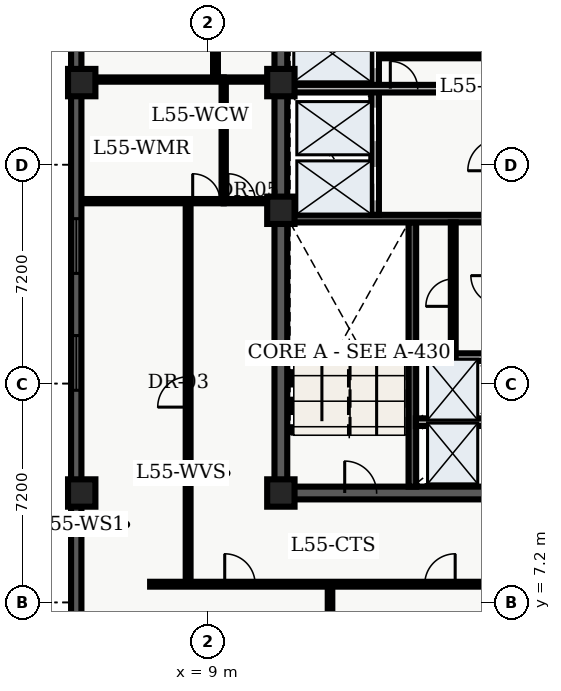
"""IFC4 building model, lengths in metres.
Left out: names, types, materials, properties, quantities, classifications, styles, units other than length and angle.
Written with IfcOpenShell. Run it as: python <this file> out.ifc"""

import sys

from ifc_helpers import new_model, entity, si_unit, converted_unit, direction, frame, origin_with_axes, origin_2d_with_axis, place, context, subcontext, project, spatial, polyline, rectangle, outline, extrude, element, fill, save


model = new_model("IFC4")
c1 = context("Model", 3, precision=1e-05, world=origin_with_axes(), true_north=direction((0.0, 1.0)))
c2 = subcontext(c1, "Body", "Model", "MODEL_VIEW")
j1 = project(units=[si_unit("LENGTHUNIT", "METRE"), converted_unit("PLANEANGLEUNIT", "DEGREE", entity("IfcPlaneAngleMeasure", 0.017), si_unit("PLANEANGLEUNIT", "RADIAN"), dimensions=[0, 0, 0, 0, 0, 0, 0])], contexts=[c1])
p1 = place(None, origin_with_axes())
s1 = spatial("IfcSite", under=j1, at=p1, CompositionType="ELEMENT")
p2 = place(p1, origin_with_axes())
s2 = spatial("IfcBuilding", under=s1, at=p2, CompositionType="ELEMENT")
p3 = place(p2, frame((0.0, 0.0, 224.7), z_axis=(0.0, 0.0, 1.0), x_axis=(1.0, 0.0, 0.0)))
s3 = spatial("IfcBuildingStorey", under=s2, at=p3, CompositionType="ELEMENT", Elevation=224.7)
p4 = place(p3, frame((11.4, 10.8, 0.0), z_axis=(0.0, 0.0, 1.0), x_axis=(0.0, 1.0, 0.0)))
e1 = element("IfcWall", 1, at=p4, inside=s3, PredefinedType="SHEAR", context=c2, shape_type="SweptSolid", body=[
    extrude(outline(polyline([(0.0, -0.21), (27.0, -0.21), (27.0, 0.21), (0.0, 0.21), (0.0, -0.21)])), origin_with_axes(), (0.0, 0.0, 1.0), 3.66),
])
p5 = place(p3, frame((11.4, 10.8, 0.0), z_axis=(0.0, 0.0, 1.0), x_axis=(1.0, 0.0, 0.0)))
e2 = element("IfcWall", 2, at=p5, inside=s3, PredefinedType="SHEAR", context=c2, shape_type="SweptSolid", body=[
    extrude(outline(polyline([(0.0, -0.21), (7.2, -0.21), (7.2, 0.21), (0.0, 0.21), (0.0, -0.21)])), origin_with_axes(), (0.0, 0.0, 1.0), 3.66),
])
p6 = place(p5, frame((2.625, 0.0, 0.0), z_axis=(0.0, 0.0, 1.0), x_axis=(1.0, 0.0, 0.0)))
e3 = element("IfcOpeningElement", 3, at=p6, cuts=e2, PredefinedType="OPENING", context=c2, shape_type="SweptSolid", body=[
    extrude(rectangle(XDim=1.05, YDim=0.44, at=origin_2d_with_axis()), origin_with_axes(), (0.0, 0.0, 1.0), 2.15),
])
p7 = place(p3, frame((15.725, 11.01, 0.0), z_axis=(0.0, 0.0, 1.0), x_axis=(0.0, 1.0, 0.0)))
e4 = element("IfcWall", 4, at=p7, inside=s3, PredefinedType="SHEAR", context=c2, shape_type="SweptSolid", body=[
    extrude(outline(polyline([(0.0, -0.125), (8.69, -0.125), (8.69, 0.125), (0.0, 0.125), (0.0, -0.125)])), origin_with_axes(), (0.0, 0.0, 1.0), 3.66),
])
p8 = place(p3, frame((11.61, 19.825, 0.0), z_axis=(0.0, 0.0, 1.0), x_axis=(1.0, 0.0, 0.0)))
e5 = element("IfcWall", 5, at=p8, inside=s3, PredefinedType="SHEAR", context=c2, shape_type="SweptSolid", body=[
    extrude(outline(polyline([(0.0, -0.125), (6.78, -0.125), (6.78, 0.125), (0.0, 0.125), (0.0, -0.125)])), origin_with_axes(), (0.0, 0.0, 1.0), 3.66),
])
p9 = place(p3, frame((14.5, 19.95, 0.0), z_axis=(0.0, 0.0, 1.0), x_axis=(0.0, 1.0, 0.0)))
e6 = element("IfcWall", 6, at=p9, inside=s3, PredefinedType="SOLIDWALL", context=c2, shape_type="SweptSolid", body=[
    extrude(outline(polyline([(0.0, -0.125), (6.25, -0.125), (6.25, 0.125), (0.0, 0.125), (0.0, -0.125)])), origin_with_axes(), (0.0, 0.0, 1.0), 2.7),
])
p10 = place(p9, frame((1.025, 0.0, 0.0), z_axis=(0.0, 0.0, 1.0), x_axis=(1.0, 0.0, 0.0)))
e7 = element("IfcOpeningElement", 7, at=p10, cuts=e6, PredefinedType="OPENING", context=c2, shape_type="SweptSolid", body=[
    extrude(rectangle(XDim=1.1, YDim=0.27, at=origin_2d_with_axis()), origin_with_axes(), (0.0, 0.0, 1.0), 2.15),
])
p11 = place(p9, frame((2.975, 0.0, 0.0), z_axis=(0.0, 0.0, 1.0), x_axis=(1.0, 0.0, 0.0)))
e8 = element("IfcOpeningElement", 8, at=p11, cuts=e6, PredefinedType="OPENING", context=c2, shape_type="SweptSolid", body=[
    extrude(rectangle(XDim=1.1, YDim=0.27, at=origin_2d_with_axis()), origin_with_axes(), (0.0, 0.0, 1.0), 2.15),
])
p12 = place(p9, frame((5.425, 0.0, 0.0), z_axis=(0.0, 0.0, 1.0), x_axis=(1.0, 0.0, 0.0)))
e9 = element("IfcOpeningElement", 9, at=p12, cuts=e6, PredefinedType="OPENING", context=c2, shape_type="SweptSolid", body=[
    extrude(rectangle(XDim=1.2, YDim=0.27, at=origin_2d_with_axis()), origin_with_axes(), (0.0, 0.0, 1.0), 2.15),
])
p13 = place(p3, frame((11.7, 24.1, 0.0), z_axis=(0.0, 0.0, 1.0), x_axis=(1.0, 0.0, 0.0)))
e10 = element("IfcWall", 10, at=p13, inside=s3, PredefinedType="SOLIDWALL", context=c2, shape_type="SweptSolid", body=[
    extrude(outline(polyline([(0.0, -0.125), (6.6, -0.125), (6.6, 0.125), (0.0, 0.125), (0.0, -0.125)])), origin_with_axes(), (0.0, 0.0, 1.0), 2.7),
])
p14 = place(p13, frame((3.75, 0.0, 0.0), z_axis=(0.0, 0.0, 1.0), x_axis=(1.0, 0.0, 0.0)))
e11 = element("IfcOpeningElement", 11, at=p14, cuts=e10, PredefinedType="OPENING", context=c2, shape_type="SweptSolid", body=[
    extrude(rectangle(XDim=0.9, YDim=0.27, at=origin_2d_with_axis()), origin_with_axes(), (0.0, 0.0, 1.0), 2.15),
])
for number, where, z_axis, x_axis in (
    (12, (11.4, 10.8, 0.0), (0.0, 0.0, 1.0), (1.0, 0.0, 0.0)),
    (13, (11.4, 20.1, 0.0), (0.0, 0.0, 1.0), (1.0, 0.0, 0.0)),
    (14, (11.4, 24.3, 0.0), (0.0, 0.0, 1.0), (1.0, 0.0, 0.0)),
    (15, (4.85, 10.8, 0.0), (0.0, 0.0, 1.0), (1.0, 0.0, 0.0)),
    (16, (4.85, 24.3, 0.0), (0.0, 0.0, 1.0), (1.0, 0.0, 0.0)),
):
    element("IfcColumn", number, at=place(p3, frame(where, z_axis=z_axis, x_axis=x_axis)), inside=s3, PredefinedType="COLUMN", context=c2, shape_type="SweptSolid", body=[
        extrude(rectangle(XDim=0.9, YDim=0.9, at=origin_2d_with_axis()), origin_with_axes(), (0.0, 0.0, 1.0), 3.9),
    ])
p15 = place(p3, frame((14.62, 25.18, 0.0), z_axis=(0.0, 0.0, 1.0), x_axis=(1.0, 0.0, 0.0)))
e17 = element("IfcWall", 17, at=p15, inside=s3, PredefinedType="PARTITIONING", context=c2, shape_type="SweptSolid", body=[
    extrude(outline(polyline([(0.0, -0.08), (3.68, -0.08), (3.68, 0.08), (0.0, 0.08), (0.0, -0.08)])), origin_with_axes(), (0.0, 0.0, 1.0), 2.7),
])
p16 = place(p15, frame((1.95, 0.0, 0.0), z_axis=(0.0, 0.0, 1.0), x_axis=(1.0, 0.0, 0.0)))
e18 = element("IfcOpeningElement", 18, at=p16, cuts=e17, PredefinedType="OPENING", context=c2, shape_type="SweptSolid", body=[
    extrude(rectangle(XDim=0.9, YDim=0.18, at=origin_2d_with_axis()), origin_with_axes(), (0.0, 0.0, 1.0), 2.15),
])
for number, where, z_axis, x_axis in (
    (19, (15.84, 13.13, 0.0), (0.0, 0.0, 1.0), (1.0, 0.0, 0.0)),
    (20, (15.84, 15.27, 0.0), (0.0, 0.0, 1.0), (1.0, 0.0, 0.0)),
):
    element("IfcWall", number, at=place(p3, frame(where, z_axis=z_axis, x_axis=x_axis)), inside=s3, PredefinedType="SOLIDWALL", context=c2, shape_type="SweptSolid", body=[
        extrude(outline(polyline([(0.0, -0.125), (2.46, -0.125), (2.46, 0.125), (0.0, 0.125), (0.0, -0.125)])), origin_with_axes(), (0.0, 0.0, 1.0), 2.7),
    ])
p17 = place(p3, frame((17.07, 15.34, 0.0), z_axis=(0.0, 0.0, 1.0), x_axis=(0.0, 1.0, 0.0)))
e21 = element("IfcWall", 21, at=p17, inside=s3, PredefinedType="PARTITIONING", context=c2, shape_type="SweptSolid", body=[
    extrude(outline(polyline([(0.0, -0.08), (4.36, -0.08), (4.36, 0.08), (0.0, 0.08), (0.0, -0.08)])), origin_with_axes(), (0.0, 0.0, 1.0), 2.7),
])
p18 = place(p17, frame((2.05, 0.0, 0.0), z_axis=(0.0, 0.0, 1.0), x_axis=(1.0, 0.0, 0.0)))
e22 = element("IfcOpeningElement", 22, at=p18, cuts=e21, PredefinedType="OPENING", context=c2, shape_type="SweptSolid", body=[
    extrude(rectangle(XDim=0.9, YDim=0.18, at=origin_2d_with_axis()), origin_with_axes(), (0.0, 0.0, 1.0), 2.15),
])
p19 = place(p3, frame((9.52, 20.4, 0.0), z_axis=(0.0, 0.0, 1.0), x_axis=(0.0, 1.0, 0.0)))
e23 = element("IfcWall", 23, at=p19, inside=s3, PredefinedType="PARTITIONING", context=c2, shape_type="SweptSolid", body=[
    extrude(outline(polyline([(0.0, -0.07), (4.0, -0.07), (4.0, 0.07), (0.0, 0.07), (0.0, -0.07)])), origin_with_axes(), (0.0, 0.0, 1.0), 2.7),
])
p20 = place(p3, frame((9.52, 20.4, 0.0), z_axis=(0.0, 0.0, 1.0), x_axis=(1.0, 0.0, 0.0)))
e24 = element("IfcWall", 24, at=p20, inside=s3, PredefinedType="PARTITIONING", context=c2, shape_type="SweptSolid", body=[
    extrude(outline(polyline([(0.0, -0.07), (1.58, -0.07), (1.58, 0.07), (0.0, 0.07), (0.0, -0.07)])), origin_with_axes(), (0.0, 0.0, 1.0), 2.7),
])
p21 = place(p20, frame((0.59, 0.0, 0.0), z_axis=(0.0, 0.0, 1.0), x_axis=(1.0, 0.0, 0.0)))
e25 = element("IfcOpeningElement", 25, at=p21, cuts=e24, PredefinedType="OPENING", context=c2, shape_type="SweptSolid", body=[
    extrude(rectangle(XDim=0.9, YDim=0.16, at=origin_2d_with_axis()), origin_with_axes(), (0.0, 0.0, 1.0), 2.15),
])
p22 = place(p3, frame((9.52, 24.4, 0.0), z_axis=(0.0, 0.0, 1.0), x_axis=(1.0, 0.0, 0.0)))
e26 = element("IfcWall", 26, at=p22, inside=s3, PredefinedType="PARTITIONING", context=c2, shape_type="SweptSolid", body=[
    extrude(outline(polyline([(0.0, -0.07), (1.58, -0.07), (1.58, 0.07), (0.0, 0.07), (0.0, -0.07)])), origin_with_axes(), (0.0, 0.0, 1.0), 2.7),
])
p23 = place(p3, frame((7.1, 7.8, 0.0), z_axis=(0.0, 0.0, 1.0), x_axis=(1.0, 0.0, 0.0)))
e27 = element("IfcWall", 27, at=p23, inside=s3, PredefinedType="PARTITIONING", context=c2, shape_type="SweptSolid", body=[
    extrude(outline(polyline([(0.0, -0.08), (13.2, -0.08), (13.2, 0.08), (0.0, 0.08), (0.0, -0.08)])), origin_with_axes(), (0.0, 0.0, 1.0), 2.7),
])
p24 = place(p23, frame((2.954, 0.0, 0.0), z_axis=(0.0, 0.0, 1.0), x_axis=(1.0, 0.0, 0.0)))
e28 = element("IfcOpeningElement", 28, at=p24, cuts=e27, PredefinedType="OPENING", context=c2, shape_type="SweptSolid", body=[
    extrude(rectangle(XDim=1.0, YDim=0.18, at=origin_2d_with_axis()), origin_with_axes(), (0.0, 0.0, 1.0), 2.15),
])
p25 = place(p23, frame((9.534, 0.0, 0.0), z_axis=(0.0, 0.0, 1.0), x_axis=(1.0, 0.0, 0.0)))
e29 = element("IfcOpeningElement", 29, at=p25, cuts=e27, PredefinedType="OPENING", context=c2, shape_type="SweptSolid", body=[
    extrude(rectangle(XDim=1.0, YDim=0.18, at=origin_2d_with_axis()), origin_with_axes(), (0.0, 0.0, 1.0), 2.15),
])
p26 = place(p3, frame((8.35, 7.8, 0.0), z_axis=(0.0, 0.0, 1.0), x_axis=(0.0, 1.0, 0.0)))
e30 = element("IfcWall", 30, at=p26, inside=s3, PredefinedType="PARTITIONING", context=c2, shape_type="SweptSolid", body=[
    extrude(outline(polyline([(0.0, -0.08), (12.6, -0.08), (12.6, 0.08), (0.0, 0.08), (0.0, -0.08)])), origin_with_axes(), (0.0, 0.0, 1.0), 2.7),
])
p27 = place(p26, frame((6.325, 0.0, 0.0), z_axis=(0.0, 0.0, 1.0), x_axis=(1.0, 0.0, 0.0)))
e31 = element("IfcOpeningElement", 31, at=p27, cuts=e30, PredefinedType="OPENING", context=c2, shape_type="SweptSolid", body=[
    extrude(rectangle(XDim=1.0, YDim=0.18, at=origin_2d_with_axis()), origin_with_axes(), (0.0, 0.0, 1.0), 2.15),
])
p28 = place(p3, frame((9.25, 24.4, 0.0), z_axis=(0.0, 0.0, 1.0), x_axis=(0.0, 1.0, 0.0)))
e32 = element("IfcWall", 32, at=p28, inside=s3, PredefinedType="PARTITIONING", context=c2, shape_type="SweptSolid", body=[
    extrude(outline(polyline([(0.0, -0.08), (16.1, -0.08), (16.1, 0.08), (0.0, 0.08), (0.0, -0.08)])), origin_with_axes(), (0.0, 0.0, 1.0), 2.7),
])
p29 = place(p28, frame((3.708, 0.0, 0.0), z_axis=(0.0, 0.0, 1.0), x_axis=(1.0, 0.0, 0.0)))
e33 = element("IfcOpeningElement", 33, at=p29, cuts=e32, PredefinedType="OPENING", context=c2, shape_type="SweptSolid", body=[
    extrude(rectangle(XDim=1.0, YDim=0.18, at=origin_2d_with_axis()), origin_with_axes(), (0.0, 0.0, 1.0), 2.15),
])
p30 = place(p28, frame((11.653, 0.0, 0.0), z_axis=(0.0, 0.0, 1.0), x_axis=(1.0, 0.0, 0.0)))
e34 = element("IfcOpeningElement", 34, at=p30, cuts=e32, PredefinedType="OPENING", context=c2, shape_type="SweptSolid", body=[
    extrude(rectangle(XDim=1.0, YDim=0.18, at=origin_2d_with_axis()), origin_with_axes(), (0.0, 0.0, 1.0), 2.15),
])
p31 = place(p3, frame((4.835, 20.4, 0.0), z_axis=(0.0, 0.0, 1.0), x_axis=(1.0, 0.0, 0.0)))
e35 = element("IfcWall", 35, at=p31, inside=s3, PredefinedType="PARTITIONING", context=c2, shape_type="SweptSolid", body=[
    extrude(outline(polyline([(0.0, -0.07), (4.685, -0.07), (4.685, 0.07), (0.0, 0.07), (0.0, -0.07)])), origin_with_axes(), (0.0, 0.0, 1.0), 2.7),
])
p32 = place(p31, frame((4.115, 0.0, 0.0), z_axis=(0.0, 0.0, 1.0), x_axis=(1.0, 0.0, 0.0)))
e36 = element("IfcOpeningElement", 36, at=p32, cuts=e35, PredefinedType="OPENING", context=c2, shape_type="SweptSolid", body=[
    extrude(rectangle(XDim=0.9, YDim=0.16, at=origin_2d_with_axis()), origin_with_axes(), (0.0, 0.0, 1.0), 2.15),
])
p33 = place(p3, frame((4.835, 24.4, 0.0), z_axis=(0.0, 0.0, 1.0), x_axis=(1.0, 0.0, 0.0)))
e37 = element("IfcWall", 37, at=p33, inside=s3, PredefinedType="PARTITIONING", context=c2, shape_type="SweptSolid", body=[
    extrude(outline(polyline([(0.0, -0.07), (4.685, -0.07), (4.685, 0.07), (0.0, 0.07), (0.0, -0.07)])), origin_with_axes(), (0.0, 0.0, 1.0), 2.7),
])
p34 = place(p3, frame((13.017, 0.335, 0.0), z_axis=(0.0, 0.0, 1.0), x_axis=(0.0, 1.0, 0.0)))
e38 = element("IfcWall", 38, at=p34, inside=s3, PredefinedType="PARTITIONING", context=c2, shape_type="SweptSolid", body=[
    extrude(outline(polyline([(0.0, -0.075), (7.365, -0.075), (7.365, 0.075), (0.0, 0.075), (0.0, -0.075)])), origin_with_axes(), (0.0, 0.0, 1.0), 2.7),
])
p35 = place(p3, frame((4.67, 2.74, 0.0), z_axis=(0.0, 0.0, 1.0), x_axis=(0.0, 1.0, 0.0)))
e39 = element("IfcWall", 39, at=p35, inside=s3, PredefinedType="SOLIDWALL", context=c2, shape_type="SweptSolid", body=[
    extrude(outline(polyline([(0.0, -0.17), (43.46, -0.17), (43.46, 0.17), (0.0, 0.17), (0.0, -0.17)])), origin_with_axes(), (0.0, 0.0, 1.0), 3.66),
])
p36 = place(p35, frame((2.948, 0.0, 0.45), z_axis=(0.0, 0.0, 1.0), x_axis=(1.0, 0.0, 0.0)))
e40 = element("IfcOpeningElement", 40, at=p36, cuts=e39, PredefinedType="OPENING", context=c2, shape_type="SweptSolid", body=[
    extrude(rectangle(XDim=1.8, YDim=0.36, at=origin_2d_with_axis()), origin_with_axes(), (0.0, 0.0, 1.0), 2.1),
])
p37 = place(p35, frame((12.339, 0.0, 0.45), z_axis=(0.0, 0.0, 1.0), x_axis=(1.0, 0.0, 0.0)))
e41 = element("IfcOpeningElement", 41, at=p37, cuts=e39, PredefinedType="OPENING", context=c2, shape_type="SweptSolid", body=[
    extrude(rectangle(XDim=1.8, YDim=0.36, at=origin_2d_with_axis()), origin_with_axes(), (0.0, 0.0, 1.0), 2.1),
])
p38 = place(p35, frame((16.184, 0.0, 0.45), z_axis=(0.0, 0.0, 1.0), x_axis=(1.0, 0.0, 0.0)))
e42 = element("IfcOpeningElement", 42, at=p38, cuts=e39, PredefinedType="OPENING", context=c2, shape_type="SweptSolid", body=[
    extrude(rectangle(XDim=1.8, YDim=0.36, at=origin_2d_with_axis()), origin_with_axes(), (0.0, 0.0, 1.0), 2.1),
])
p39 = place(p35, frame((26.426, 0.0, 0.45), z_axis=(0.0, 0.0, 1.0), x_axis=(1.0, 0.0, 0.0)))
e43 = element("IfcOpeningElement", 43, at=p39, cuts=e39, PredefinedType="OPENING", context=c2, shape_type="SweptSolid", body=[
    extrude(rectangle(XDim=1.8, YDim=0.36, at=origin_2d_with_axis()), origin_with_axes(), (0.0, 0.0, 1.0), 2.1),
])
p40 = place(p35, frame((31.121, 0.0, 0.45), z_axis=(0.0, 0.0, 1.0), x_axis=(1.0, 0.0, 0.0)))
e44 = element("IfcOpeningElement", 44, at=p40, cuts=e39, PredefinedType="OPENING", context=c2, shape_type="SweptSolid", body=[
    extrude(rectangle(XDim=1.8, YDim=0.36, at=origin_2d_with_axis()), origin_with_axes(), (0.0, 0.0, 1.0), 2.1),
])
p41 = place(p35, frame((40.062, 0.0, 0.45), z_axis=(0.0, 0.0, 1.0), x_axis=(1.0, 0.0, 0.0)))
e45 = element("IfcOpeningElement", 45, at=p41, cuts=e39, PredefinedType="OPENING", context=c2, shape_type="SweptSolid", body=[
    extrude(rectangle(XDim=1.8, YDim=0.36, at=origin_2d_with_axis()), origin_with_axes(), (0.0, 0.0, 1.0), 2.1),
])
p42 = place(p9, frame((1.025, 0.0, 0.0), z_axis=(0.0, 0.0, 1.0), x_axis=(1.0, 0.0, 0.0)))
e46 = element("IfcDoor", 46, at=p42, inside=s3, OperationType="SLIDING_TO_LEFT", PredefinedType="DOOR", context=c2, shape_type="SweptSolid", body=[
    extrude(rectangle(XDim=1.1, YDim=0.09, at=origin_2d_with_axis()), origin_with_axes(), (0.0, 0.0, 1.0), 2.15),
])
fill(e7, e46)
p43 = place(p9, frame((2.975, 0.0, 0.0), z_axis=(0.0, 0.0, 1.0), x_axis=(1.0, 0.0, 0.0)))
e47 = element("IfcDoor", 47, at=p43, inside=s3, OperationType="SLIDING_TO_RIGHT", PredefinedType="DOOR", context=c2, shape_type="SweptSolid", body=[
    extrude(rectangle(XDim=1.1, YDim=0.09, at=origin_2d_with_axis()), origin_with_axes(), (0.0, 0.0, 1.0), 2.15),
])
fill(e8, e47)
p44 = place(p9, frame((5.425, 0.0, 0.0), z_axis=(0.0, 0.0, 1.0), x_axis=(1.0, 0.0, 0.0)))
e48 = element("IfcDoor", 48, at=p44, inside=s3, OperationType="DOUBLE_DOOR_SLIDING", PredefinedType="DOOR", context=c2, shape_type="SweptSolid", body=[
    extrude(rectangle(XDim=1.2, YDim=0.09, at=origin_2d_with_axis()), origin_with_axes(), (0.0, 0.0, 1.0), 2.15),
])
fill(e9, e48)
p45 = place(p5, frame((2.625, 0.0, 0.0), z_axis=(0.0, 0.0, 1.0), x_axis=(1.0, 0.0, 0.0)))
e49 = element("IfcDoor", 49, at=p45, inside=s3, OperationType="SINGLE_SWING_LEFT", PredefinedType="DOOR", context=c2, shape_type="SweptSolid", body=[
    extrude(rectangle(XDim=1.05, YDim=0.09, at=origin_2d_with_axis()), origin_with_axes(), (0.0, 0.0, 1.0), 2.15),
])
fill(e3, e49)
p46 = place(p13, frame((3.75, 0.0, 0.0), z_axis=(0.0, 0.0, 1.0), x_axis=(1.0, 0.0, 0.0)))
e50 = element("IfcDoor", 50, at=p46, inside=s3, OperationType="SINGLE_SWING_LEFT", PredefinedType="DOOR", context=c2, shape_type="SweptSolid", body=[
    extrude(rectangle(XDim=0.9, YDim=0.09, at=origin_2d_with_axis()), origin_with_axes(), (0.0, 0.0, 1.0), 2.15),
])
fill(e11, e50)
p47 = place(p15, frame((1.95, 0.0, 0.0), z_axis=(0.0, 0.0, 1.0), x_axis=(1.0, 0.0, 0.0)))
e51 = element("IfcDoor", 51, at=p47, inside=s3, OperationType="SINGLE_SWING_LEFT", PredefinedType="DOOR", context=c2, shape_type="SweptSolid", body=[
    extrude(rectangle(XDim=0.9, YDim=0.09, at=origin_2d_with_axis()), origin_with_axes(), (0.0, 0.0, 1.0), 2.15),
])
fill(e18, e51)
p48 = place(p17, frame((2.05, 0.0, 0.0), z_axis=(0.0, 0.0, 1.0), x_axis=(1.0, 0.0, 0.0)))
e52 = element("IfcDoor", 52, at=p48, inside=s3, OperationType="SINGLE_SWING_LEFT", PredefinedType="DOOR", context=c2, shape_type="SweptSolid", body=[
    extrude(rectangle(XDim=0.9, YDim=0.09, at=origin_2d_with_axis()), origin_with_axes(), (0.0, 0.0, 1.0), 2.15),
])
fill(e22, e52)
p49 = place(p20, frame((0.59, 0.0, 0.0), z_axis=(0.0, 0.0, 1.0), x_axis=(1.0, 0.0, 0.0)))
e53 = element("IfcDoor", 53, at=p49, inside=s3, OperationType="SINGLE_SWING_LEFT", PredefinedType="DOOR", context=c2, shape_type="SweptSolid", body=[
    extrude(rectangle(XDim=0.9, YDim=0.084, at=origin_2d_with_axis()), origin_with_axes(), (0.0, 0.0, 1.0), 2.15),
])
fill(e25, e53)
p50 = place(p31, frame((4.115, 0.0, 0.0), z_axis=(0.0, 0.0, 1.0), x_axis=(1.0, 0.0, 0.0)))
e54 = element("IfcDoor", 54, at=p50, inside=s3, OperationType="SINGLE_SWING_LEFT", PredefinedType="DOOR", context=c2, shape_type="SweptSolid", body=[
    extrude(rectangle(XDim=0.9, YDim=0.084, at=origin_2d_with_axis()), origin_with_axes(), (0.0, 0.0, 1.0), 2.15),
])
fill(e36, e54)
p51 = place(p26, frame((6.325, 0.0, 0.0), z_axis=(0.0, 0.0, 1.0), x_axis=(1.0, 0.0, 0.0)))
e55 = element("IfcDoor", 55, at=p51, inside=s3, OperationType="SINGLE_SWING_LEFT", PredefinedType="DOOR", context=c2, shape_type="SweptSolid", body=[
    extrude(rectangle(XDim=1.0, YDim=0.09, at=origin_2d_with_axis()), origin_with_axes(), (0.0, 0.0, 1.0), 2.15),
])
fill(e31, e55)
p52 = place(p23, frame((2.954, 0.0, 0.0), z_axis=(0.0, 0.0, 1.0), x_axis=(1.0, 0.0, 0.0)))
e56 = element("IfcDoor", 56, at=p52, inside=s3, OperationType="SINGLE_SWING_LEFT", PredefinedType="DOOR", context=c2, shape_type="SweptSolid", body=[
    extrude(rectangle(XDim=1.0, YDim=0.09, at=origin_2d_with_axis()), origin_with_axes(), (0.0, 0.0, 1.0), 2.15),
])
fill(e28, e56)
p53 = place(p23, frame((9.534, 0.0, 0.0), z_axis=(0.0, 0.0, 1.0), x_axis=(1.0, 0.0, 0.0)))
e57 = element("IfcDoor", 57, at=p53, inside=s3, OperationType="SINGLE_SWING_RIGHT", PredefinedType="DOOR", context=c2, shape_type="SweptSolid", body=[
    extrude(rectangle(XDim=1.0, YDim=0.09, at=origin_2d_with_axis()), origin_with_axes(), (0.0, 0.0, 1.0), 2.15),
])
fill(e29, e57)
p54 = place(p35, frame((12.339, 0.0, 0.45), z_axis=(0.0, 0.0, 1.0), x_axis=(1.0, 0.0, 0.0)))
e58 = element("IfcWindow", 58, at=p54, inside=s3, PredefinedType="WINDOW", context=c2, shape_type="SweptSolid", body=[
    extrude(rectangle(XDim=1.8, YDim=0.09, at=origin_2d_with_axis()), origin_with_axes(), (0.0, 0.0, 1.0), 2.1),
])
fill(e41, e58)
p55 = place(p35, frame((16.184, 0.0, 0.45), z_axis=(0.0, 0.0, 1.0), x_axis=(1.0, 0.0, 0.0)))
e59 = element("IfcWindow", 59, at=p55, inside=s3, PredefinedType="WINDOW", context=c2, shape_type="SweptSolid", body=[
    extrude(rectangle(XDim=1.8, YDim=0.09, at=origin_2d_with_axis()), origin_with_axes(), (0.0, 0.0, 1.0), 2.1),
])
fill(e42, e59)
save(model, sys.argv[1])
